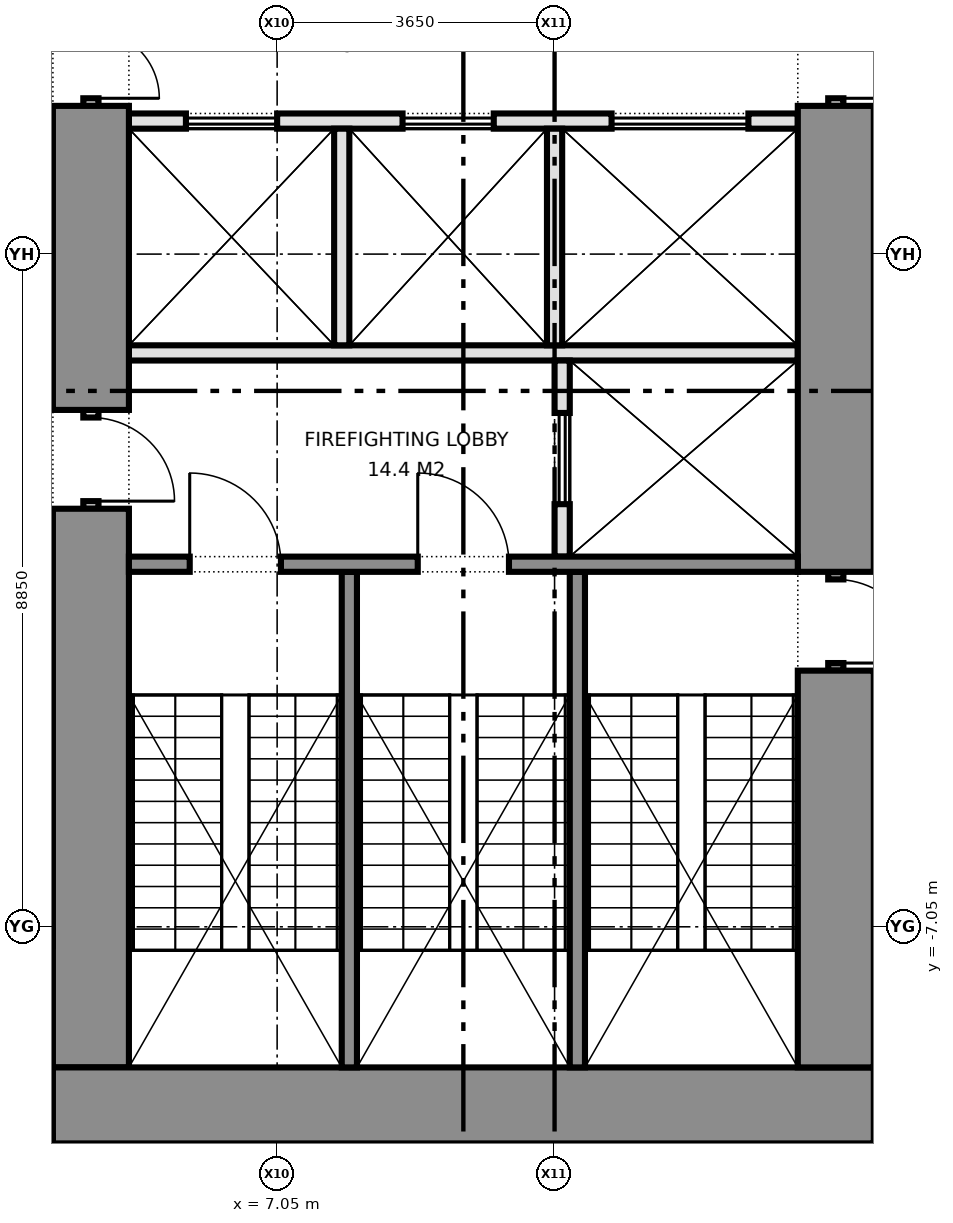
"""IFC4 building model, lengths in metres.
Left out: names, types, materials, properties, quantities, classifications, styles, units other than length and angle.
Written with IfcOpenShell. Run it as: python <this file> out.ifc"""

import sys

from ifc_helpers import new_model, si_unit, direction, frame, frame_2d, origin, place, context, subcontext, project, spatial, rectangle, extrude, element, fill, save


model = new_model("IFC4")
c1 = context("Model", 3, precision=1e-05, world=origin(), true_north=direction((0.0, 1.0)))
c2 = subcontext(c1, "Body", "Model", "MODEL_VIEW")
j1 = project(units=[si_unit("LENGTHUNIT", "METRE"), si_unit("PLANEANGLEUNIT", "RADIAN")], contexts=[c1])
p1 = place(None, origin())
s1 = spatial("IfcSite", under=j1, at=p1, CompositionType="ELEMENT")
p2 = place(p1, origin())
s2 = spatial("IfcBuilding", under=s1, at=p2, CompositionType="ELEMENT")
p3 = place(p2, frame((0.0, 0.0, 86.4)))
s3 = spatial("IfcBuildingStorey", under=s2, at=p3, CompositionType="ELEMENT", Elevation=86.4)
p4 = place(p3, frame((14.9, -9.4, 0.0), z_axis=(0.0, 0.0, 1.0), x_axis=(-1.0, 0.0, 0.0)))
e1 = element("IfcWall", 1, at=p4, inside=s3, PredefinedType="SHEAR", context=c2, shape_type="SweptSolid", body=[
    extrude(rectangle(XDim=10.8, YDim=1.0, at=frame_2d((5.4, 0.0))), origin(), (0.0, 0.0, 1.0), 4.2),
])
p5 = place(p3, frame((14.4, 5.75, 0.0), z_axis=(0.0, 0.0, 1.0), x_axis=(0.0, -1.0, 0.0)))
e2 = element("IfcWall", 2, at=p5, inside=s3, PredefinedType="PARTITIONING", context=c2, shape_type="SweptSolid", body=[
    extrude(rectangle(XDim=2.0, YDim=0.2, at=frame_2d((1.0, 0.0))), origin(), (0.0, 0.0, 1.0), 2.4),
])
p6 = place(p5, frame((0.1, 0.0, 0.0)))
e3 = element("IfcOpeningElement", 3, at=p6, cuts=e2, PredefinedType="OPENING", context=c2, shape_type="SweptSolid", body=[
    extrude(rectangle(XDim=1.8, YDim=2.1, at=frame_2d((0.9, 1.05))), frame((0.0, 0.11, 0.0), z_axis=(0.0, -1.0, 0.0), x_axis=(1.0, 0.0, 0.0)), (0.0, 0.0, 1.0), 0.22),
])
p7 = place(p3, frame((14.4, 3.75, 0.0), z_axis=(0.0, 0.0, 1.0), x_axis=(0.0, -1.0, 0.0)))
e4 = element("IfcWall", 4, at=p7, inside=s3, PredefinedType="SHEAR", context=c2, shape_type="SweptSolid", body=[
    extrude(rectangle(XDim=6.13, YDim=1.0, at=frame_2d((3.065, 0.0))), origin(), (0.0, 0.0, 1.0), 4.2),
])
p8 = place(p3, frame((14.4, -2.38, 0.0), z_axis=(0.0, 0.0, 1.0), x_axis=(0.0, -1.0, 0.0)))
e5 = element("IfcWall", 5, at=p8, inside=s3, PredefinedType="SHEAR", context=c2, shape_type="SweptSolid", body=[
    extrude(rectangle(XDim=1.3, YDim=0.2, at=frame_2d((0.65, 0.0))), origin(), (0.0, 0.0, 1.0), 2.4),
])
p9 = place(p8, frame((0.1, 0.0, 0.0)))
e6 = element("IfcOpeningElement", 6, at=p9, cuts=e5, PredefinedType="OPENING", context=c2, shape_type="SweptSolid", body=[
    extrude(rectangle(XDim=1.1, YDim=2.1, at=frame_2d((0.55, 1.05))), frame((0.0, 0.11, 0.0), z_axis=(0.0, -1.0, 0.0), x_axis=(1.0, 0.0, 0.0)), (0.0, 0.0, 1.0), 0.22),
])
p10 = place(p3, frame((14.4, -3.68, 0.0), z_axis=(0.0, 0.0, 1.0), x_axis=(0.0, -1.0, 0.0)))
e7 = element("IfcWall", 7, at=p10, inside=s3, PredefinedType="SHEAR", context=c2, shape_type="SweptSolid", body=[
    extrude(rectangle(XDim=5.22, YDim=1.0, at=frame_2d((2.61, 0.0))), origin(), (0.0, 0.0, 1.0), 4.2),
])
p11 = place(p3, frame((4.6, 5.75, 0.0), z_axis=(0.0, 0.0, 1.0), x_axis=(0.0, -1.0, 0.0)))
e8 = element("IfcWall", 8, at=p11, inside=s3, PredefinedType="PARTITIONING", context=c2, shape_type="SweptSolid", body=[
    extrude(rectangle(XDim=2.0, YDim=0.2, at=frame_2d((1.0, 0.0))), origin(), (0.0, 0.0, 1.0), 2.4),
])
p12 = place(p11, frame((0.1, 0.0, 0.0)))
e9 = element("IfcOpeningElement", 9, at=p12, cuts=e8, PredefinedType="OPENING", context=c2, shape_type="SweptSolid", body=[
    extrude(rectangle(XDim=1.8, YDim=2.1, at=frame_2d((0.9, 1.05))), frame((0.0, 0.11, 0.0), z_axis=(0.0, -1.0, 0.0), x_axis=(1.0, 0.0, 0.0)), (0.0, 0.0, 1.0), 0.22),
])
p13 = place(p3, frame((4.6, 3.75, 0.0), z_axis=(0.0, 0.0, 1.0), x_axis=(0.0, -1.0, 0.0)))
e10 = element("IfcWall", 10, at=p13, inside=s3, PredefinedType="SHEAR", context=c2, shape_type="SweptSolid", body=[
    extrude(rectangle(XDim=4.0, YDim=1.0, at=frame_2d((2.0, 0.0))), origin(), (0.0, 0.0, 1.0), 4.2),
])
p14 = place(p3, frame((4.6, -0.25, 0.0), z_axis=(0.0, 0.0, 1.0), x_axis=(0.0, -1.0, 0.0)))
e11 = element("IfcWall", 11, at=p14, inside=s3, PredefinedType="PARTITIONING", context=c2, shape_type="SweptSolid", body=[
    extrude(rectangle(XDim=1.3, YDim=0.2, at=frame_2d((0.65, 0.0))), origin(), (0.0, 0.0, 1.0), 2.4),
])
p15 = place(p14, frame((0.1, 0.0, 0.0)))
e12 = element("IfcOpeningElement", 12, at=p15, cuts=e11, PredefinedType="OPENING", context=c2, shape_type="SweptSolid", body=[
    extrude(rectangle(XDim=1.1, YDim=2.1, at=frame_2d((0.55, 1.05))), frame((0.0, 0.11, 0.0), z_axis=(0.0, -1.0, 0.0), x_axis=(1.0, 0.0, 0.0)), (0.0, 0.0, 1.0), 0.22),
])
p16 = place(p3, frame((4.6, -1.55, 0.0), z_axis=(0.0, 0.0, 1.0), x_axis=(0.0, -1.0, 0.0)))
e13 = element("IfcWall", 13, at=p16, inside=s3, PredefinedType="SHEAR", context=c2, shape_type="SweptSolid", body=[
    extrude(rectangle(XDim=7.35, YDim=1.0, at=frame_2d((3.675, 0.0))), origin(), (0.0, 0.0, 1.0), 4.2),
])
p17 = place(p3, frame((13.9, 3.55, 0.0), z_axis=(0.0, 0.0, 1.0), x_axis=(-1.0, 0.0, 0.0)))
e14 = element("IfcWall", 14, at=p17, inside=s3, PredefinedType="PARTITIONING", context=c2, shape_type="SweptSolid", body=[
    extrude(rectangle(XDim=8.8, YDim=0.2, at=frame_2d((4.4, 0.0))), origin(), (0.0, 0.0, 1.0), 4.2),
])
p18 = place(p17, frame((0.65, 0.0, 0.0)))
e15 = element("IfcOpeningElement", 15, at=p18, cuts=e14, PredefinedType="OPENING", context=c2, shape_type="SweptSolid", body=[
    extrude(rectangle(XDim=1.8, YDim=2.1, at=frame_2d((0.9, 1.05))), frame((0.0, 0.11, 0.0), z_axis=(0.0, -1.0, 0.0), x_axis=(1.0, 0.0, 0.0)), (0.0, 0.0, 1.0), 0.22),
])
p19 = place(p17, frame((4.0, 0.0, 0.0)))
e16 = element("IfcOpeningElement", 16, at=p19, cuts=e14, PredefinedType="OPENING", context=c2, shape_type="SweptSolid", body=[
    extrude(rectangle(XDim=1.2, YDim=2.1, at=frame_2d((0.6, 1.05))), frame((0.0, 0.11, 0.0), z_axis=(0.0, -1.0, 0.0), x_axis=(1.0, 0.0, 0.0)), (0.0, 0.0, 1.0), 0.22),
])
p20 = place(p17, frame((6.85, 0.0, 0.0)))
e17 = element("IfcOpeningElement", 17, at=p20, cuts=e14, PredefinedType="OPENING", context=c2, shape_type="SweptSolid", body=[
    extrude(rectangle(XDim=1.2, YDim=2.1, at=frame_2d((0.6, 1.05))), frame((0.0, 0.11, 0.0), z_axis=(0.0, -1.0, 0.0), x_axis=(1.0, 0.0, 0.0)), (0.0, 0.0, 1.0), 0.22),
])
p21 = place(p3, frame((13.9, 0.5, 0.0), z_axis=(0.0, 0.0, 1.0), x_axis=(-1.0, 0.0, 0.0)))
e18 = element("IfcWall", 18, at=p21, inside=s3, PredefinedType="PARTITIONING", context=c2, shape_type="SweptSolid", body=[
    extrude(rectangle(XDim=8.8, YDim=0.2, at=frame_2d((4.4, 0.0))), origin(), (0.0, 0.0, 1.0), 4.2),
])
p22 = place(p3, frame((10.8, 0.4, 0.0), z_axis=(0.0, 0.0, 1.0), x_axis=(0.0, -1.0, 0.0)))
e19 = element("IfcWall", 19, at=p22, inside=s3, PredefinedType="PARTITIONING", context=c2, shape_type="SweptSolid", body=[
    extrude(rectangle(XDim=2.58, YDim=0.2, at=frame_2d((1.29, 0.0))), origin(), (0.0, 0.0, 1.0), 4.2),
])
p23 = place(p22, frame((0.69, 0.0, 0.0)))
e20 = element("IfcOpeningElement", 20, at=p23, cuts=e19, PredefinedType="OPENING", context=c2, shape_type="SweptSolid", body=[
    extrude(rectangle(XDim=1.2, YDim=2.1, at=frame_2d((0.6, 1.05))), frame((0.0, 0.11, 0.0), z_axis=(0.0, -1.0, 0.0), x_axis=(1.0, 0.0, 0.0)), (0.0, 0.0, 1.0), 0.22),
])
p24 = place(p3, frame((13.9, -2.28, 0.0), z_axis=(0.0, 0.0, 1.0), x_axis=(-1.0, 0.0, 0.0)))
e21 = element("IfcWall", 21, at=p24, inside=s3, PredefinedType="SHEAR", context=c2, shape_type="SweptSolid", body=[
    extrude(rectangle(XDim=8.8, YDim=0.2, at=frame_2d((4.4, 0.0))), origin(), (0.0, 0.0, 1.0), 4.2),
])
p25 = place(p24, frame((3.8, 0.0, 0.0)))
e22 = element("IfcOpeningElement", 22, at=p25, cuts=e21, PredefinedType="OPENING", context=c2, shape_type="SweptSolid", body=[
    extrude(rectangle(XDim=1.2, YDim=2.1, at=frame_2d((0.6, 1.05))), frame((0.0, 0.11, 0.0), z_axis=(0.0, -1.0, 0.0), x_axis=(1.0, 0.0, 0.0)), (0.0, 0.0, 1.0), 0.22),
])
p26 = place(p24, frame((6.8, 0.0, 0.0)))
e23 = element("IfcOpeningElement", 23, at=p26, cuts=e21, PredefinedType="OPENING", context=c2, shape_type="SweptSolid", body=[
    extrude(rectangle(XDim=1.2, YDim=2.1, at=frame_2d((0.6, 1.05))), frame((0.0, 0.11, 0.0), z_axis=(0.0, -1.0, 0.0), x_axis=(1.0, 0.0, 0.0)), (0.0, 0.0, 1.0), 0.22),
])
for number, where, z_axis, x_axis in (
    (24, (11.0, -2.38, 0.0), (0.0, 0.0, 1.0), (0.0, -1.0, 0.0)),
    (25, (8.0, -2.38, 0.0), (0.0, 0.0, 1.0), (0.0, -1.0, 0.0)),
):
    element("IfcWall", number, at=place(p3, frame(where, z_axis=z_axis, x_axis=x_axis)), inside=s3, PredefinedType="SHEAR", context=c2, shape_type="SweptSolid", body=[
        extrude(rectangle(XDim=6.52, YDim=0.2, at=frame_2d((3.26, 0.0))), origin(), (0.0, 0.0, 1.0), 4.2),
    ])
for number, where, z_axis, x_axis in (
    (26, (10.7, 3.45, 0.0), (0.0, 0.0, 1.0), (0.0, -1.0, 0.0)),
    (27, (7.9, 3.45, 0.0), (0.0, 0.0, 1.0), (0.0, -1.0, 0.0)),
):
    element("IfcWall", number, at=place(p3, frame(where, z_axis=z_axis, x_axis=x_axis)), inside=s3, PredefinedType="PARTITIONING", context=c2, shape_type="SweptSolid", body=[
        extrude(rectangle(XDim=2.85, YDim=0.2, at=frame_2d((1.425, 0.0))), origin(), (0.0, 0.0, 1.0), 4.2),
    ])
p27 = place(p6, origin())
e28 = element("IfcDoor", 28, at=p27, inside=s3, OperationType="DOUBLE_DOOR_SINGLE_SWING", PredefinedType="DOOR", context=c2, shape_type="SweptSolid", body=[
    extrude(rectangle(XDim=1.8, YDim=2.1, at=frame_2d((0.9, 1.05))), frame((0.0, 0.025, 0.0), z_axis=(0.0, -1.0, 0.0), x_axis=(1.0, 0.0, 0.0)), (0.0, 0.0, 1.0), 0.05),
])
fill(e3, e28)
p28 = place(p9, origin())
e29 = element("IfcDoor", 29, at=p28, inside=s3, OperationType="SINGLE_SWING_RIGHT", PredefinedType="DOOR", context=c2, shape_type="SweptSolid", body=[
    extrude(rectangle(XDim=1.1, YDim=2.1, at=frame_2d((0.55, 1.05))), frame((0.0, 0.025, 0.0), z_axis=(0.0, -1.0, 0.0), x_axis=(1.0, 0.0, 0.0)), (0.0, 0.0, 1.0), 0.05),
])
fill(e6, e29)
p29 = place(p12, origin())
e30 = element("IfcDoor", 30, at=p29, inside=s3, OperationType="DOUBLE_DOOR_SINGLE_SWING", PredefinedType="DOOR", context=c2, shape_type="SweptSolid", body=[
    extrude(rectangle(XDim=1.8, YDim=2.1, at=frame_2d((0.9, 1.05))), frame((0.0, 0.025, 0.0), z_axis=(0.0, -1.0, 0.0), x_axis=(1.0, 0.0, 0.0)), (0.0, 0.0, 1.0), 0.05),
])
fill(e9, e30)
p30 = place(p15, origin())
e31 = element("IfcDoor", 31, at=p30, inside=s3, OperationType="SINGLE_SWING_RIGHT", PredefinedType="DOOR", context=c2, shape_type="SweptSolid", body=[
    extrude(rectangle(XDim=1.1, YDim=2.1, at=frame_2d((0.55, 1.05))), frame((0.0, 0.025, 0.0), z_axis=(0.0, -1.0, 0.0), x_axis=(1.0, 0.0, 0.0)), (0.0, 0.0, 1.0), 0.05),
])
fill(e12, e31)
p31 = place(p18, origin())
e32 = element("IfcDoor", 32, at=p31, inside=s3, OperationType="DOUBLE_DOOR_SLIDING", PredefinedType="DOOR", context=c2, shape_type="SweptSolid", body=[
    extrude(rectangle(XDim=1.8, YDim=2.1, at=frame_2d((0.9, 1.05))), frame((0.0, 0.025, 0.0), z_axis=(0.0, -1.0, 0.0), x_axis=(1.0, 0.0, 0.0)), (0.0, 0.0, 1.0), 0.05),
])
fill(e15, e32)
p32 = place(p19, origin())
e33 = element("IfcDoor", 33, at=p32, inside=s3, OperationType="DOUBLE_DOOR_SLIDING", PredefinedType="DOOR", context=c2, shape_type="SweptSolid", body=[
    extrude(rectangle(XDim=1.2, YDim=2.1, at=frame_2d((0.6, 1.05))), frame((0.0, 0.025, 0.0), z_axis=(0.0, -1.0, 0.0), x_axis=(1.0, 0.0, 0.0)), (0.0, 0.0, 1.0), 0.05),
])
fill(e16, e33)
p33 = place(p20, origin())
e34 = element("IfcDoor", 34, at=p33, inside=s3, OperationType="DOUBLE_DOOR_SLIDING", PredefinedType="DOOR", context=c2, shape_type="SweptSolid", body=[
    extrude(rectangle(XDim=1.2, YDim=2.1, at=frame_2d((0.6, 1.05))), frame((0.0, 0.025, 0.0), z_axis=(0.0, -1.0, 0.0), x_axis=(1.0, 0.0, 0.0)), (0.0, 0.0, 1.0), 0.05),
])
fill(e17, e34)
p34 = place(p23, origin())
e35 = element("IfcDoor", 35, at=p34, inside=s3, OperationType="DOUBLE_DOOR_SLIDING", PredefinedType="DOOR", context=c2, shape_type="SweptSolid", body=[
    extrude(rectangle(XDim=1.2, YDim=2.1, at=frame_2d((0.6, 1.05))), frame((0.0, 0.025, 0.0), z_axis=(0.0, -1.0, 0.0), x_axis=(1.0, 0.0, 0.0)), (0.0, 0.0, 1.0), 0.05),
])
fill(e20, e35)
p35 = place(p25, frame((1.2, 0.0, 0.0), z_axis=(0.0, 0.0, 1.0), x_axis=(-1.0, 0.0, 0.0)))
e36 = element("IfcDoor", 36, at=p35, inside=s3, OperationType="SINGLE_SWING_LEFT", PredefinedType="DOOR", context=c2, shape_type="SweptSolid", body=[
    extrude(rectangle(XDim=1.2, YDim=2.1, at=frame_2d((0.6, 1.05))), frame((0.0, 0.025, 0.0), z_axis=(0.0, -1.0, 0.0), x_axis=(1.0, 0.0, 0.0)), (0.0, 0.0, 1.0), 0.05),
])
fill(e22, e36)
p36 = place(p26, frame((1.2, 0.0, 0.0), z_axis=(0.0, 0.0, 1.0), x_axis=(-1.0, 0.0, 0.0)))
e37 = element("IfcDoor", 37, at=p36, inside=s3, OperationType="SINGLE_SWING_LEFT", PredefinedType="DOOR", context=c2, shape_type="SweptSolid", body=[
    extrude(rectangle(XDim=1.2, YDim=2.1, at=frame_2d((0.6, 1.05))), frame((0.0, 0.025, 0.0), z_axis=(0.0, -1.0, 0.0), x_axis=(1.0, 0.0, 0.0)), (0.0, 0.0, 1.0), 0.05),
])
fill(e23, e37)
save(model, sys.argv[1])
